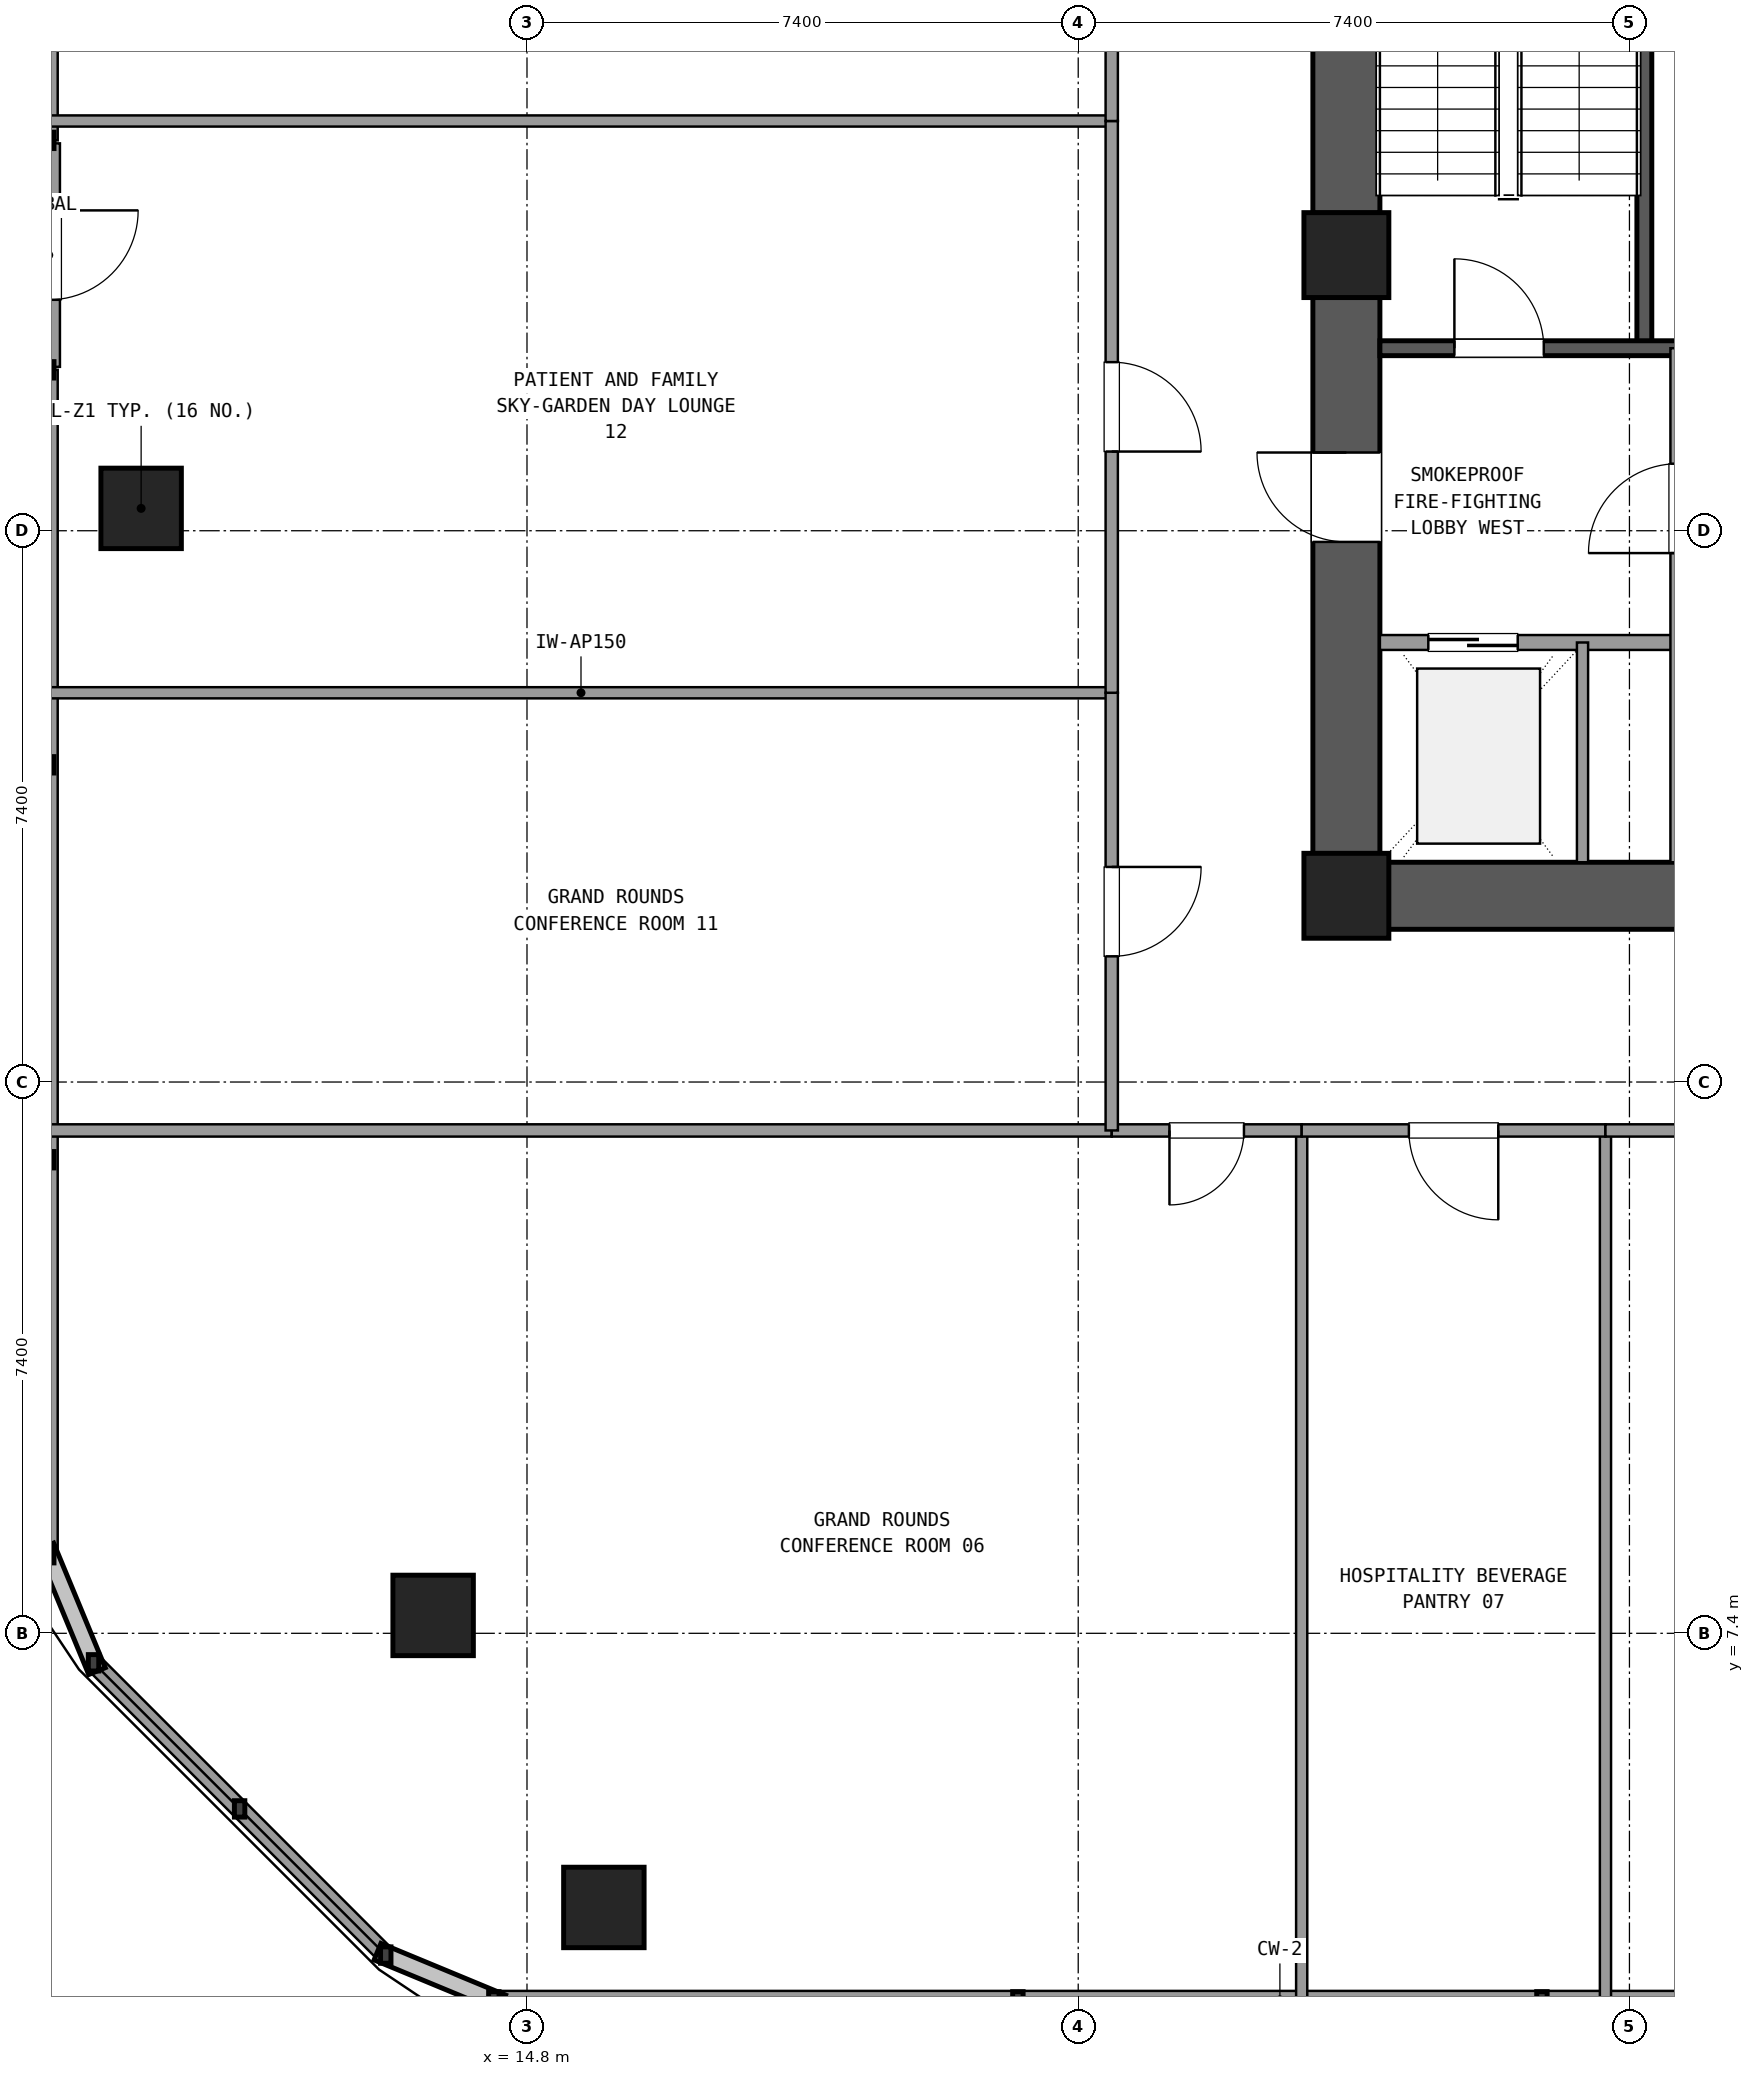
"""IFC4 building model, lengths in metres.
Left out: names, types, materials, properties, quantities, classifications, styles, units other than length and angle.
Written with IfcOpenShell. Run it as: python <this file> out.ifc"""

import sys

from ifc_helpers import new_model, si_unit, direction, frame, frame_2d, origin, origin_2d, place, context, subcontext, project, spatial, rectangle, extrude, element, fill, save


model = new_model("IFC4")
c1 = context("Model", 3, precision=1e-05, world=origin(), true_north=direction((0.0, 1.0)))
c2 = subcontext(c1, "Body", "Model", "MODEL_VIEW")
j1 = project(units=[si_unit("LENGTHUNIT", "METRE"), si_unit("PLANEANGLEUNIT", "RADIAN")], contexts=[c1])
p1 = place(None, origin())
s1 = spatial("IfcSite", under=j1, at=p1, CompositionType="ELEMENT")
p2 = place(p1, origin())
s2 = spatial("IfcBuilding", under=s1, at=p2, CompositionType="ELEMENT")
p3 = place(p2, frame((0.0, 0.0, 49.14)))
s3 = spatial("IfcBuildingStorey", under=s2, at=p3, CompositionType="ELEMENT", Elevation=49.14)
for number, where, z_axis, x_axis in (
    (1, (25.8, 17.3, 0.0), (0.0, 0.0, 1.0), (1.0, 0.0, 0.0)),
    (2, (25.8, 25.9, 0.0), (0.0, 0.0, 1.0), (1.0, 0.0, 0.0)),
):
    element("IfcColumn", number, at=place(p3, frame(where, z_axis=z_axis, x_axis=x_axis)), inside=s3, PredefinedType="COLUMN", context=c2, shape_type="SweptSolid", body=[
        extrude(rectangle(XDim=1.14, YDim=1.14, at=origin_2d()), origin(), (0.0, 0.0, 1.0), 3.6),
    ])
p4 = place(p3, frame((26.365, 17.3, 0.0), z_axis=(0.0, 0.0, 1.0), x_axis=(1.0, 0.0, 0.0)))
e3 = element("IfcWall", 3, at=p4, inside=s3, PredefinedType="SHEAR", context=c2, shape_type="SweptSolid", body=[
    extrude(rectangle(XDim=10.07, YDim=0.9, at=frame_2d((5.035, 0.0))), origin(), (0.0, 0.0, 1.0), 3.32),
])
p5 = place(p3, frame((25.8, 33.935, 0.0), z_axis=(0.0, 0.0, 1.0), x_axis=(0.0, -1.0, 0.0)))
e4 = element("IfcWall", 4, at=p5, inside=s3, PredefinedType="SHEAR", context=c2, shape_type="SweptSolid", body=[
    extrude(rectangle(XDim=7.47, YDim=0.9, at=frame_2d((3.735, 0.0))), origin(), (0.0, 0.0, 1.0), 3.32),
])
p6 = place(p3, frame((25.8, 25.335, 0.0), z_axis=(0.0, 0.0, 1.0), x_axis=(0.0, -1.0, 0.0)))
e5 = element("IfcWall", 5, at=p6, inside=s3, PredefinedType="SHEAR", context=c2, shape_type="SweptSolid", body=[
    extrude(rectangle(XDim=7.47, YDim=0.9, at=frame_2d((3.735, 0.0))), origin(), (0.0, 0.0, 1.0), 3.32),
])
p7 = place(p6, frame((2.085, 0.0, 0.0)))
e6 = element("IfcOpeningElement", 6, at=p7, cuts=e5, PredefinedType="OPENING", context=c2, shape_type="SweptSolid", body=[
    extrude(rectangle(XDim=1.2, YDim=2.15, at=frame_2d((0.6, 1.075))), frame((0.0, 0.46, 0.0), z_axis=(0.0, -1.0, 0.0), x_axis=(1.0, 0.0, 0.0)), (0.0, 0.0, 1.0), 0.92),
])
for number, where, z_axis, x_axis in (
    (7, (9.62, 22.5, 0.0), (0.0, 0.0, 1.0), (1.0, 0.0, 0.0)),
    (8, (13.54, 7.64, 0.0), (0.0, 0.0, 1.0), (1.0, 0.0, 0.0)),
    (9, (15.832, 3.72, 0.0), (0.0, 0.0, 1.0), (1.0, 0.0, 0.0)),
):
    element("IfcColumn", number, at=place(p3, frame(where, z_axis=z_axis, x_axis=x_axis)), inside=s3, PredefinedType="COLUMN", context=c2, shape_type="SweptSolid", body=[
        extrude(rectangle(XDim=1.08, YDim=1.08, at=origin_2d()), origin(), (0.0, 0.0, 1.0), 3.6),
    ])
p8 = place(p3, frame((14.355, 2.48, 0.0), z_axis=(0.0, 0.0, 1.0), x_axis=(1.0, 0.0, 0.0)))
e10 = element("IfcWall", 10, at=p8, inside=s3, PredefinedType="SOLIDWALL", context=c2, shape_type="SweptSolid", body=[
    extrude(rectangle(XDim=21.105, YDim=0.24, at=frame_2d((10.552, 0.0))), origin(), (0.0, 0.0, 1.0), 0.85),
])
p9 = place(p3, frame((8.38, 27.4, 0.0), z_axis=(0.0, 0.0, 1.0), x_axis=(0.0, -1.0, 0.0)))
e11 = element("IfcWall", 11, at=p9, inside=s3, PredefinedType="SOLIDWALL", context=c2, shape_type="SweptSolid", body=[
    extrude(rectangle(XDim=3.0, YDim=0.3, at=frame_2d((1.5, 0.0))), origin(), (0.0, 0.0, 1.0), 2.65),
])
p10 = place(p9, frame((0.9, 0.0, 0.0)))
e12 = element("IfcOpeningElement", 12, at=p10, cuts=e11, PredefinedType="OPENING", context=c2, shape_type="SweptSolid", body=[
    extrude(rectangle(XDim=1.2, YDim=2.2, at=frame_2d((0.6, 1.1))), frame((0.0, 0.16, 0.0), z_axis=(0.0, -1.0, 0.0), x_axis=(1.0, 0.0, 0.0)), (0.0, 0.0, 1.0), 0.32),
])
for number, where, z_axis, x_axis in (
    (13, (8.38, 43.345, 0.0), (0.0, 0.0, 1.0), (0.0, -1.0, 0.0)),
    (14, (8.38, 24.36, 0.0), (0.0, 0.0, 1.0), (0.0, -1.0, 0.0)),
):
    element("IfcWall", number, at=place(p3, frame(where, z_axis=z_axis, x_axis=x_axis)), inside=s3, PredefinedType="SOLIDWALL", context=c2, shape_type="SweptSolid", body=[
        extrude(rectangle(XDim=15.905, YDim=0.24, at=frame_2d((7.953, 0.0))), origin(), (0.0, 0.0, 1.0), 0.85),
    ])
p11 = place(p3, frame((8.981, 7.004, 0.0), z_axis=(0.0, 0.0, 1.0), x_axis=(0.707128783731, -0.707084777957, 0.0)))
e15 = element("IfcWall", 15, at=p11, inside=s3, PredefinedType="SOLIDWALL", context=c2, shape_type="SweptSolid", body=[
    extrude(rectangle(XDim=5.548, YDim=0.24, at=frame_2d((2.774, 0.0))), origin(), (0.0, 0.0, 1.0), 0.85),
])
p12 = place(p3, frame((29.8, 24.65, 0.0), z_axis=(0.0, 0.0, 1.0), x_axis=(0.0, 1.0, 0.0)))
e16 = element("IfcWall", 16, at=p12, inside=s3, PredefinedType="SHEAR", context=c2, shape_type="SweptSolid", body=[
    extrude(rectangle(XDim=9.4, YDim=0.2, at=frame_2d((4.7, 0.0))), origin(), (0.0, 0.0, 1.0), 3.32),
])
p13 = place(p3, frame((26.25, 24.65, 0.0), z_axis=(0.0, 0.0, 1.0), x_axis=(1.0, 0.0, 0.0)))
e17 = element("IfcWall", 17, at=p13, inside=s3, PredefinedType="SHEAR", context=c2, shape_type="SweptSolid", body=[
    extrude(rectangle(XDim=4.0, YDim=0.2, at=frame_2d((2.0, 0.0))), origin(), (0.0, 0.0, 1.0), 3.32),
])
p14 = place(p13, frame((1.0, 0.0, 0.0)))
e18 = element("IfcOpeningElement", 18, at=p14, cuts=e17, PredefinedType="OPENING", context=c2, shape_type="SweptSolid", body=[
    extrude(rectangle(XDim=1.2, YDim=2.15, at=frame_2d((0.6, 1.075))), frame((0.0, 0.11, 0.0), z_axis=(0.0, -1.0, 0.0), x_axis=(1.0, 0.0, 0.0)), (0.0, 0.0, 1.0), 0.22),
])
p15 = place(p3, frame((26.25, 20.7, 0.0), z_axis=(0.0, 0.0, 1.0), x_axis=(1.0, 0.0, 0.0)))
e19 = element("IfcWall", 19, at=p15, inside=s3, PredefinedType="SOLIDWALL", context=c2, shape_type="SweptSolid", body=[
    extrude(rectangle(XDim=4.0, YDim=0.2, at=frame_2d((2.0, 0.0))), origin(), (0.0, 0.0, 1.0), 2.61),
])
p16 = place(p15, frame((0.65, 0.0, 0.0)))
e20 = element("IfcOpeningElement", 20, at=p16, cuts=e19, PredefinedType="OPENING", context=c2, shape_type="SweptSolid", body=[
    extrude(rectangle(XDim=1.2, YDim=2.15, at=frame_2d((0.6, 1.075))), frame((0.0, 0.11, 0.0), z_axis=(0.0, -1.0, 0.0), x_axis=(1.0, 0.0, 0.0)), (0.0, 0.0, 1.0), 0.22),
])
p17 = place(p3, frame((30.25, 17.75, 0.0), z_axis=(0.0, 0.0, 1.0), x_axis=(0.0, 1.0, 0.0)))
e21 = element("IfcWall", 21, at=p17, inside=s3, PredefinedType="SOLIDWALL", context=c2, shape_type="SweptSolid", body=[
    extrude(rectangle(XDim=6.9, YDim=0.2, at=frame_2d((3.45, 0.0))), origin(), (0.0, 0.0, 1.0), 2.61),
])
p18 = place(p17, frame((4.15, 0.0, 0.0)))
e22 = element("IfcOpeningElement", 22, at=p18, cuts=e21, PredefinedType="OPENING", context=c2, shape_type="SweptSolid", body=[
    extrude(rectangle(XDim=1.2, YDim=2.15, at=frame_2d((0.6, 1.075))), frame((0.0, 0.11, 0.0), z_axis=(0.0, -1.0, 0.0), x_axis=(1.0, 0.0, 0.0)), (0.0, 0.0, 1.0), 0.22),
])
p19 = place(p3, frame((28.97, 17.75, 0.0), z_axis=(0.0, 0.0, 1.0), x_axis=(0.0, 1.0, 0.0)))
e23 = element("IfcWall", 23, at=p19, inside=s3, PredefinedType="PARTITIONING", context=c2, shape_type="SweptSolid", body=[
    extrude(rectangle(XDim=2.95, YDim=0.15, at=frame_2d((1.475, 0.0))), origin(), (0.0, 0.0, 1.0), 2.61),
])
p20 = place(p3, frame((8.4, 14.15, 0.0), z_axis=(0.0, 0.0, 1.0), x_axis=(1.0, 0.0, 0.0)))
e24 = element("IfcWall", 24, at=p20, inside=s3, PredefinedType="PARTITIONING", context=c2, shape_type="SweptSolid", body=[
    extrude(rectangle(XDim=14.25, YDim=0.165, at=frame_2d((7.125, 0.0))), origin(), (0.0, 0.0, 1.0), 2.61),
])
p21 = place(p3, frame((25.2, 14.15, 0.0), z_axis=(0.0, 0.0, 1.0), x_axis=(0.0, -1.0, 0.0)))
e25 = element("IfcWall", 25, at=p21, inside=s3, PredefinedType="PARTITIONING", context=c2, shape_type="SweptSolid", body=[
    extrude(rectangle(XDim=11.65, YDim=0.15, at=frame_2d((5.825, 0.0))), origin(), (0.0, 0.0, 1.0), 2.61),
])
p22 = place(p3, frame((22.65, 14.15, 0.0), z_axis=(0.0, 0.0, 1.0), x_axis=(1.0, 0.0, 0.0)))
e26 = element("IfcWall", 26, at=p22, inside=s3, PredefinedType="PARTITIONING", context=c2, shape_type="SweptSolid", body=[
    extrude(rectangle(XDim=2.55, YDim=0.165, at=frame_2d((1.275, 0.0))), origin(), (0.0, 0.0, 1.0), 2.61),
])
p23 = place(p22, frame((0.775, 0.0, 0.0)))
e27 = element("IfcOpeningElement", 27, at=p23, cuts=e26, PredefinedType="OPENING", context=c2, shape_type="SweptSolid", body=[
    extrude(rectangle(XDim=1.0, YDim=2.15, at=frame_2d((0.5, 1.075))), frame((0.0, 0.093, 0.0), z_axis=(0.0, -1.0, 0.0), x_axis=(1.0, 0.0, 0.0)), (0.0, 0.0, 1.0), 0.185),
])
p24 = place(p3, frame((29.278, 14.15, 0.0), z_axis=(0.0, 0.0, 1.0), x_axis=(0.0, -1.0, 0.0)))
e28 = element("IfcWall", 28, at=p24, inside=s3, PredefinedType="PARTITIONING", context=c2, shape_type="SweptSolid", body=[
    extrude(rectangle(XDim=11.65, YDim=0.15, at=frame_2d((5.825, 0.0))), origin(), (0.0, 0.0, 1.0), 2.61),
])
p25 = place(p3, frame((25.2, 14.15, 0.0), z_axis=(0.0, 0.0, 1.0), x_axis=(1.0, 0.0, 0.0)))
e29 = element("IfcWall", 29, at=p25, inside=s3, PredefinedType="PARTITIONING", context=c2, shape_type="SweptSolid", body=[
    extrude(rectangle(XDim=4.078, YDim=0.165, at=frame_2d((2.039, 0.0))), origin(), (0.0, 0.0, 1.0), 2.61),
])
p26 = place(p25, frame((1.439, 0.0, 0.0)))
e30 = element("IfcOpeningElement", 30, at=p26, cuts=e29, PredefinedType="OPENING", context=c2, shape_type="SweptSolid", body=[
    extrude(rectangle(XDim=1.2, YDim=2.15, at=frame_2d((0.6, 1.075))), frame((0.0, 0.093, 0.0), z_axis=(0.0, -1.0, 0.0), x_axis=(1.0, 0.0, 0.0)), (0.0, 0.0, 1.0), 0.185),
])
p27 = place(p3, frame((29.278, 14.15, 0.0), z_axis=(0.0, 0.0, 1.0), x_axis=(1.0, 0.0, 0.0)))
e31 = element("IfcWall", 31, at=p27, inside=s3, PredefinedType="PARTITIONING", context=c2, shape_type="SweptSolid", body=[
    extrude(rectangle(XDim=10.557, YDim=0.165, at=frame_2d((5.278, 0.0))), origin(), (0.0, 0.0, 1.0), 2.61),
])
p28 = place(p27, frame((4.679, 0.0, 0.0)))
e32 = element("IfcOpeningElement", 32, at=p28, cuts=e31, PredefinedType="OPENING", context=c2, shape_type="SweptSolid", body=[
    extrude(rectangle(XDim=1.2, YDim=2.15, at=frame_2d((0.6, 1.075))), frame((0.0, 0.093, 0.0), z_axis=(0.0, -1.0, 0.0), x_axis=(1.0, 0.0, 0.0)), (0.0, 0.0, 1.0), 0.185),
])
p29 = place(p3, frame((22.65, 20.025, 0.0), z_axis=(0.0, 0.0, 1.0), x_axis=(-1.0, 0.0, 0.0)))
e33 = element("IfcWall", 33, at=p29, inside=s3, PredefinedType="PARTITIONING", context=c2, shape_type="SweptSolid", body=[
    extrude(rectangle(XDim=14.25, YDim=0.15, at=frame_2d((7.125, 0.0))), origin(), (0.0, 0.0, 1.0), 2.61),
])
p30 = place(p3, frame((22.65, 14.15, 0.0), z_axis=(0.0, 0.0, 1.0), x_axis=(0.0, 1.0, 0.0)))
e34 = element("IfcWall", 34, at=p30, inside=s3, PredefinedType="PARTITIONING", context=c2, shape_type="SweptSolid", body=[
    extrude(rectangle(XDim=5.875, YDim=0.165, at=frame_2d((2.938, 0.0))), origin(), (0.0, 0.0, 1.0), 2.61),
])
p31 = place(p30, frame((2.337, 0.0, 0.0)))
e35 = element("IfcOpeningElement", 35, at=p31, cuts=e34, PredefinedType="OPENING", context=c2, shape_type="SweptSolid", body=[
    extrude(rectangle(XDim=1.2, YDim=2.15, at=frame_2d((0.6, 1.075))), frame((0.0, 0.093, 0.0), z_axis=(0.0, -1.0, 0.0), x_axis=(1.0, 0.0, 0.0)), (0.0, 0.0, 1.0), 0.185),
])
p32 = place(p3, frame((22.65, 27.7, 0.0), z_axis=(0.0, 0.0, 1.0), x_axis=(-1.0, 0.0, 0.0)))
e36 = element("IfcWall", 36, at=p32, inside=s3, PredefinedType="PARTITIONING", context=c2, shape_type="SweptSolid", body=[
    extrude(rectangle(XDim=14.25, YDim=0.15, at=frame_2d((7.125, 0.0))), origin(), (0.0, 0.0, 1.0), 2.61),
])
p33 = place(p3, frame((22.65, 20.025, 0.0), z_axis=(0.0, 0.0, 1.0), x_axis=(0.0, 1.0, 0.0)))
e37 = element("IfcWall", 37, at=p33, inside=s3, PredefinedType="PARTITIONING", context=c2, shape_type="SweptSolid", body=[
    extrude(rectangle(XDim=7.675, YDim=0.165, at=frame_2d((3.837, 0.0))), origin(), (0.0, 0.0, 1.0), 2.61),
])
p34 = place(p33, frame((3.238, 0.0, 0.0)))
e38 = element("IfcOpeningElement", 38, at=p34, cuts=e37, PredefinedType="OPENING", context=c2, shape_type="SweptSolid", body=[
    extrude(rectangle(XDim=1.2, YDim=2.15, at=frame_2d((0.6, 1.075))), frame((0.0, 0.093, 0.0), z_axis=(0.0, -1.0, 0.0), x_axis=(1.0, 0.0, 0.0)), (0.0, 0.0, 1.0), 0.185),
])
p35 = place(p3, frame((22.65, 27.7, 0.0), z_axis=(0.0, 0.0, 1.0), x_axis=(0.0, 1.0, 0.0)))
e39 = element("IfcWall", 39, at=p35, inside=s3, PredefinedType="PARTITIONING", context=c2, shape_type="SweptSolid", body=[
    extrude(rectangle(XDim=4.31, YDim=0.165, at=frame_2d((2.155, 0.0))), origin(), (0.0, 0.0, 1.0), 2.61),
])
p36 = place(p35, frame((1.555, 0.0, 0.0)))
e40 = element("IfcOpeningElement", 40, at=p36, cuts=e39, PredefinedType="OPENING", context=c2, shape_type="SweptSolid", body=[
    extrude(rectangle(XDim=1.2, YDim=2.15, at=frame_2d((0.6, 1.075))), frame((0.0, 0.093, 0.0), z_axis=(0.0, -1.0, 0.0), x_axis=(1.0, 0.0, 0.0)), (0.0, 0.0, 1.0), 0.185),
])
p37 = place(p14, origin())
e41 = element("IfcDoor", 41, at=p37, inside=s3, OperationType="SINGLE_SWING_LEFT", PredefinedType="DOOR", context=c2, shape_type="SweptSolid", body=[
    extrude(rectangle(XDim=1.2, YDim=2.15, at=frame_2d((0.6, 1.075))), frame((0.0, 0.025, 0.0), z_axis=(0.0, -1.0, 0.0), x_axis=(1.0, 0.0, 0.0)), (0.0, 0.0, 1.0), 0.05),
])
fill(e18, e41)
p38 = place(p16, origin())
e42 = element("IfcDoor", 42, at=p38, inside=s3, OperationType="SLIDING_TO_LEFT", PredefinedType="DOOR", context=c2, shape_type="SweptSolid", body=[
    extrude(rectangle(XDim=1.2, YDim=2.15, at=frame_2d((0.6, 1.075))), frame((0.0, 0.025, 0.0), z_axis=(0.0, -1.0, 0.0), x_axis=(1.0, 0.0, 0.0)), (0.0, 0.0, 1.0), 0.05),
])
fill(e20, e42)
p39 = place(p7, frame((1.2, 0.0, 0.0), z_axis=(0.0, 0.0, 1.0), x_axis=(-1.0, 0.0, 0.0)))
e43 = element("IfcDoor", 43, at=p39, inside=s3, OperationType="SINGLE_SWING_LEFT", PredefinedType="DOOR", context=c2, shape_type="SweptSolid", body=[
    extrude(rectangle(XDim=1.2, YDim=2.15, at=frame_2d((0.6, 1.075))), frame((0.0, 0.025, 0.0), z_axis=(0.0, -1.0, 0.0), x_axis=(1.0, 0.0, 0.0)), (0.0, 0.0, 1.0), 0.05),
])
fill(e6, e43)
p40 = place(p23, frame((1.0, 0.0, 0.0), z_axis=(0.0, 0.0, 1.0), x_axis=(-1.0, 0.0, 0.0)))
e44 = element("IfcDoor", 44, at=p40, inside=s3, OperationType="SINGLE_SWING_LEFT", PredefinedType="DOOR", context=c2, shape_type="SweptSolid", body=[
    extrude(rectangle(XDim=1.0, YDim=2.15, at=frame_2d((0.5, 1.075))), frame((0.0, 0.025, 0.0), z_axis=(0.0, -1.0, 0.0), x_axis=(1.0, 0.0, 0.0)), (0.0, 0.0, 1.0), 0.05),
])
fill(e27, e44)
p41 = place(p26, frame((1.2, 0.0, 0.0), z_axis=(0.0, 0.0, 1.0), x_axis=(-1.0, 0.0, 0.0)))
e45 = element("IfcDoor", 45, at=p41, inside=s3, OperationType="SINGLE_SWING_RIGHT", PredefinedType="DOOR", context=c2, shape_type="SweptSolid", body=[
    extrude(rectangle(XDim=1.2, YDim=2.15, at=frame_2d((0.6, 1.075))), frame((0.0, 0.025, 0.0), z_axis=(0.0, -1.0, 0.0), x_axis=(1.0, 0.0, 0.0)), (0.0, 0.0, 1.0), 0.05),
])
fill(e30, e45)
p42 = place(p31, frame((1.2, 0.0, 0.0), z_axis=(0.0, 0.0, 1.0), x_axis=(-1.0, 0.0, 0.0)))
e46 = element("IfcDoor", 46, at=p42, inside=s3, OperationType="SINGLE_SWING_RIGHT", PredefinedType="DOOR", context=c2, shape_type="SweptSolid", body=[
    extrude(rectangle(XDim=1.2, YDim=2.15, at=frame_2d((0.6, 1.075))), frame((0.0, 0.025, 0.0), z_axis=(0.0, -1.0, 0.0), x_axis=(1.0, 0.0, 0.0)), (0.0, 0.0, 1.0), 0.05),
])
fill(e35, e46)
p43 = place(p34, frame((1.2, 0.0, 0.0), z_axis=(0.0, 0.0, 1.0), x_axis=(-1.0, 0.0, 0.0)))
e47 = element("IfcDoor", 47, at=p43, inside=s3, OperationType="SINGLE_SWING_LEFT", PredefinedType="DOOR", context=c2, shape_type="SweptSolid", body=[
    extrude(rectangle(XDim=1.2, YDim=2.15, at=frame_2d((0.6, 1.075))), frame((0.0, 0.025, 0.0), z_axis=(0.0, -1.0, 0.0), x_axis=(1.0, 0.0, 0.0)), (0.0, 0.0, 1.0), 0.05),
])
fill(e38, e47)
save(model, sys.argv[1])
